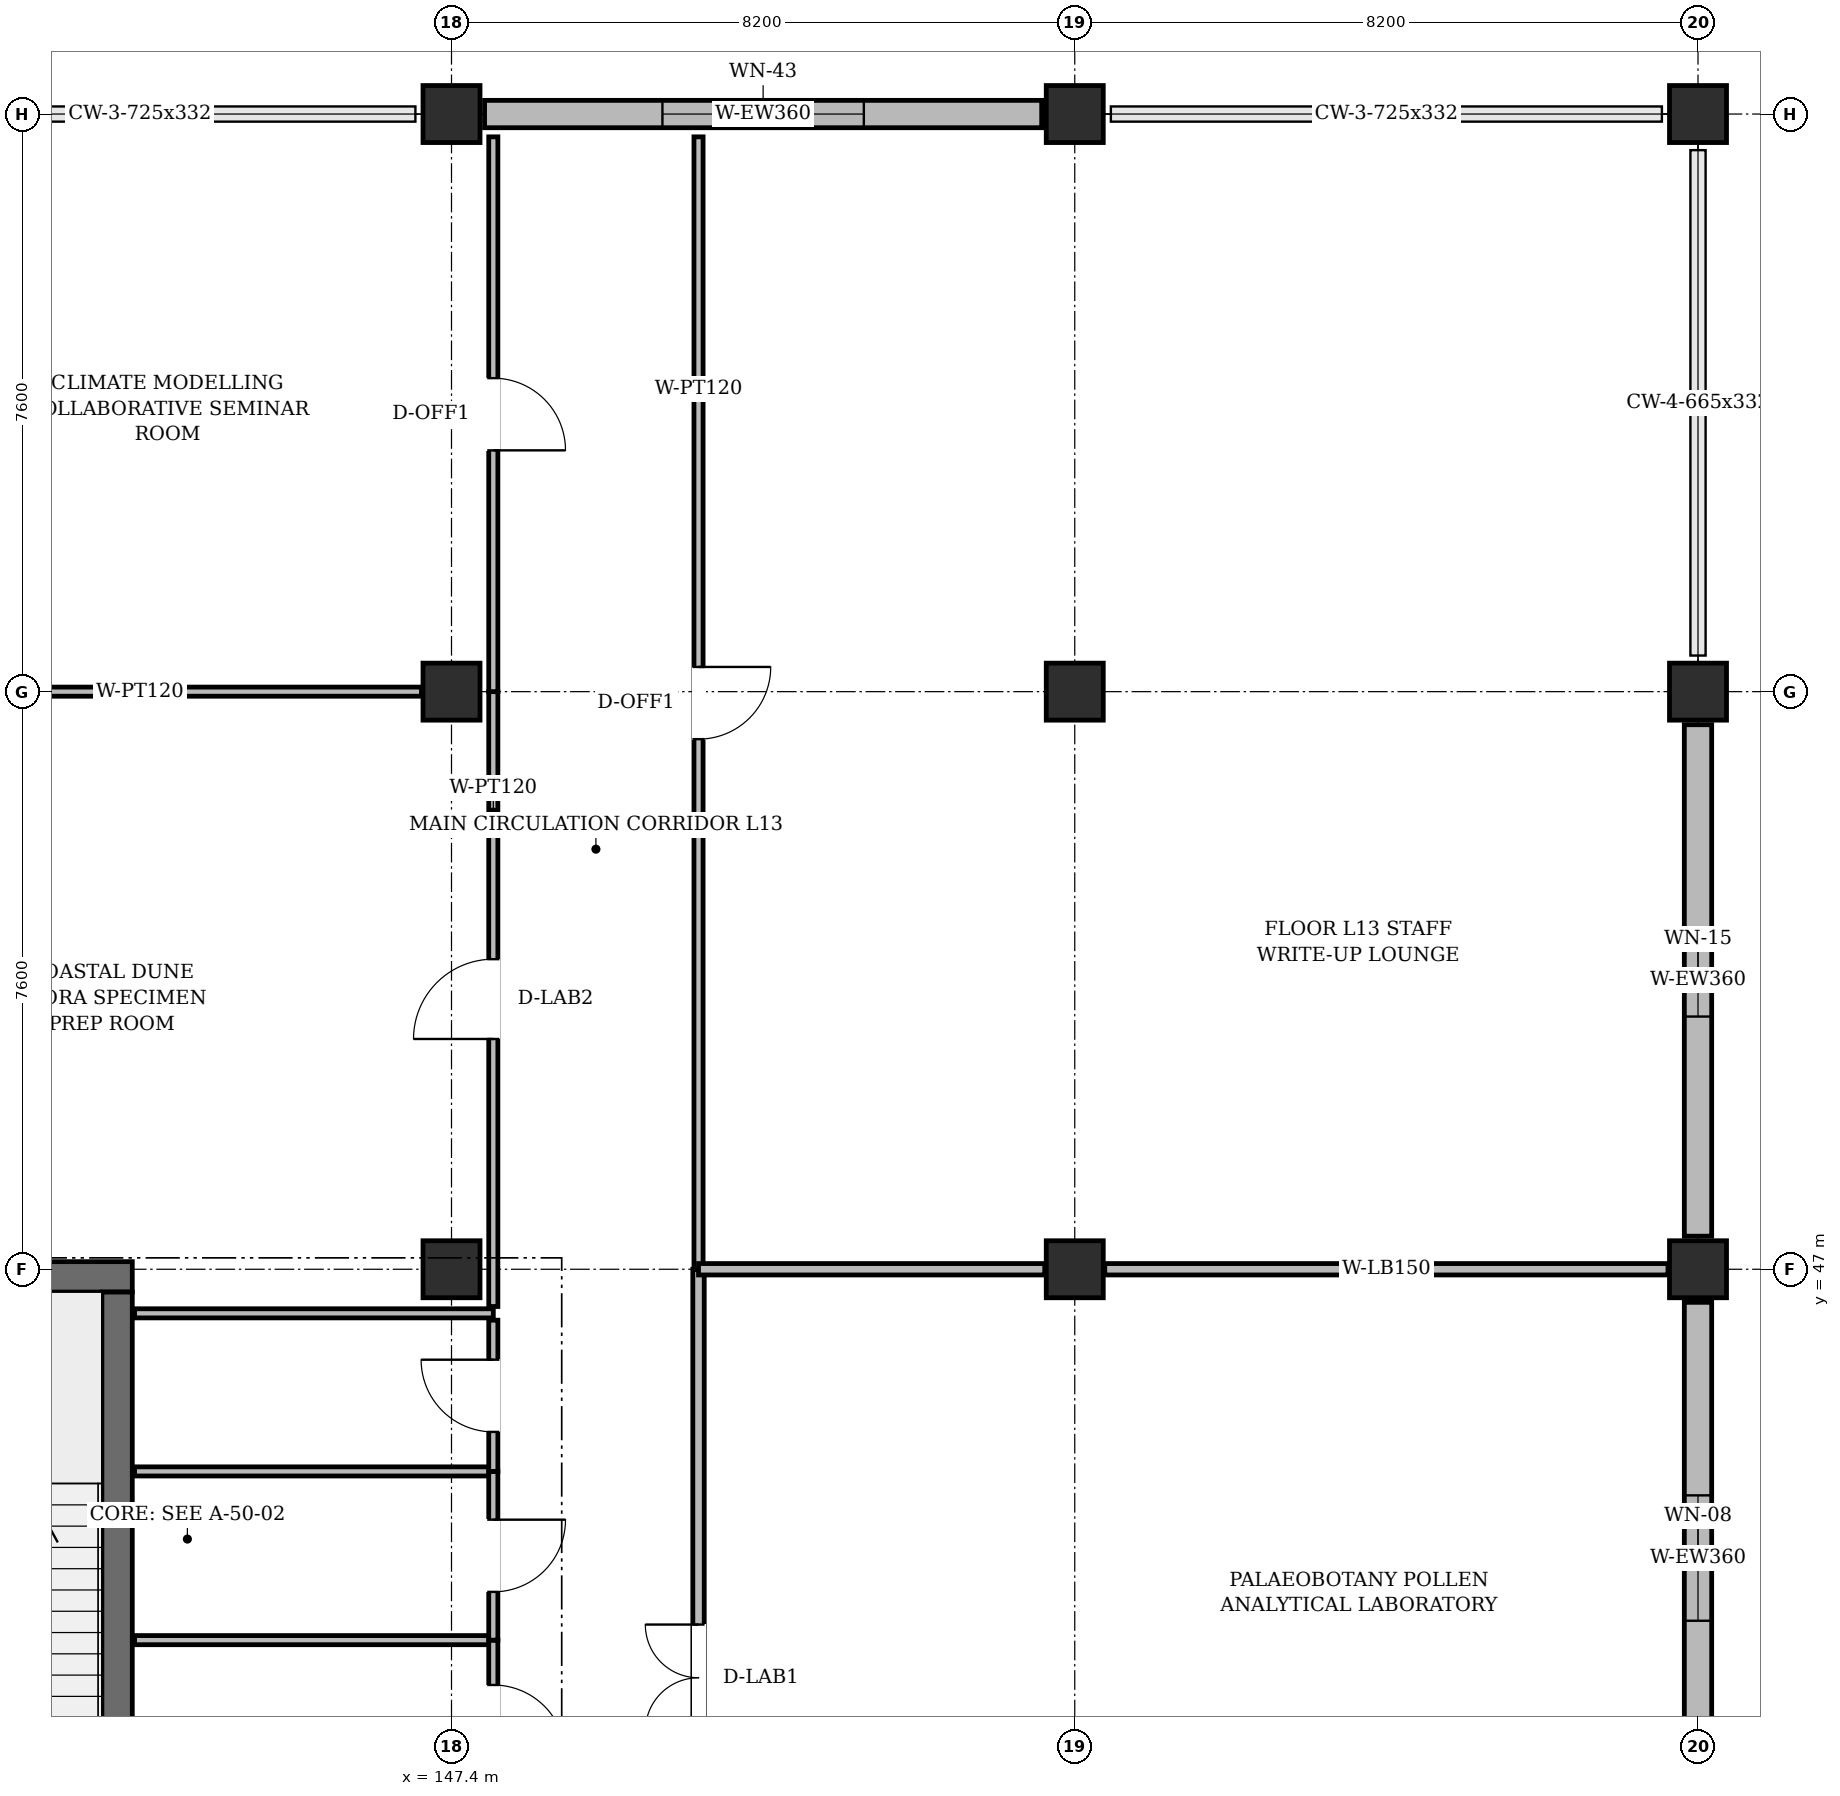
"""IFC4 building model, lengths in metres.
Left out: names, types, materials, properties, quantities, classifications, styles, units other than length and angle.
Written with IfcOpenShell. Run it as: python <this file> out.ifc"""

import sys

from ifc_helpers import new_model, si_unit, direction, frame, frame_2d, origin, origin_2d, place, context, subcontext, project, spatial, rectangle, extrude, element, fill, save


model = new_model("IFC4")
c1 = context("Model", 3, precision=1e-05, world=origin(), true_north=direction((0.0, 1.0)))
c2 = subcontext(c1, "Body", "Model", "MODEL_VIEW")
j1 = project(units=[si_unit("LENGTHUNIT", "METRE"), si_unit("PLANEANGLEUNIT", "RADIAN")], contexts=[c1])
p1 = place(None, origin())
s1 = spatial("IfcSite", under=j1, at=p1, CompositionType="ELEMENT")
p2 = place(p1, origin())
s2 = spatial("IfcBuilding", under=s1, at=p2, CompositionType="ELEMENT")
p3 = place(p2, frame((0.0, 0.0, 57.6)))
s3 = spatial("IfcBuildingStorey", under=s2, at=p3, CompositionType="ELEMENT", Elevation=57.6)
for number, where, z_axis, x_axis in (
    (1, (147.4, 47.0, 0.0), (0.0, 0.0, 1.0), (1.0, 0.0, 0.0)),
    (2, (147.4, 54.6, 0.0), (0.0, 0.0, 1.0), (1.0, 0.0, 0.0)),
    (3, (147.4, 62.2, 0.0), (0.0, 0.0, 1.0), (1.0, 0.0, 0.0)),
    (4, (155.6, 47.0, 0.0), (0.0, 0.0, 1.0), (1.0, 0.0, 0.0)),
    (5, (155.6, 54.6, 0.0), (0.0, 0.0, 1.0), (1.0, 0.0, 0.0)),
    (6, (155.6, 62.2, 0.0), (0.0, 0.0, 1.0), (1.0, 0.0, 0.0)),
    (7, (163.8, 47.0, 0.0), (0.0, 0.0, 1.0), (1.0, 0.0, 0.0)),
    (8, (163.8, 54.6, 0.0), (0.0, 0.0, 1.0), (1.0, 0.0, 0.0)),
    (9, (163.8, 62.2, 0.0), (0.0, 0.0, 1.0), (1.0, 0.0, 0.0)),
):
    element("IfcColumn", number, at=place(p3, frame(where, z_axis=z_axis, x_axis=x_axis)), inside=s3, PredefinedType="COLUMN", context=c2, shape_type="SweptSolid", body=[
        extrude(rectangle(XDim=0.75, YDim=0.75, at=origin_2d()), origin(), (0.0, 0.0, 1.0), 3.92),
    ])
p4 = place(p3, frame((163.8, 39.835, 0.0), z_axis=(0.0, 0.0, 1.0), x_axis=(0.0, 1.0, 0.0)))
e10 = element("IfcWall", 10, at=p4, inside=s3, PredefinedType="SOLIDWALL", context=c2, shape_type="SweptSolid", body=[
    extrude(rectangle(XDim=6.73, YDim=0.36, at=frame_2d((3.365, 0.0))), origin(), (0.0, 0.0, 1.0), 3.305),
])
p5 = place(p4, frame((2.54, 0.0, 0.95)))
e11 = element("IfcOpeningElement", 11, at=p5, cuts=e10, PredefinedType="OPENING", context=c2, shape_type="SweptSolid", body=[
    extrude(rectangle(XDim=1.65, YDim=2.0, at=frame_2d((0.825, 1.0))), frame((0.0, 0.192, 0.0), z_axis=(0.0, -1.0, 0.0), x_axis=(1.0, 0.0, 0.0)), (0.0, 0.0, 1.0), 0.384),
])
p6 = place(p3, frame((163.8, 47.435, 0.0), z_axis=(0.0, 0.0, 1.0), x_axis=(0.0, 1.0, 0.0)))
e12 = element("IfcWall", 12, at=p6, inside=s3, PredefinedType="SOLIDWALL", context=c2, shape_type="SweptSolid", body=[
    extrude(rectangle(XDim=6.73, YDim=0.36, at=frame_2d((3.365, 0.0))), origin(), (0.0, 0.0, 1.0), 3.305),
])
p7 = place(p6, frame((2.89, 0.0, 0.95)))
e13 = element("IfcOpeningElement", 13, at=p7, cuts=e12, PredefinedType="OPENING", context=c2, shape_type="SweptSolid", body=[
    extrude(rectangle(XDim=0.95, YDim=1.75, at=frame_2d((0.475, 0.875))), frame((0.0, 0.192, 0.0), z_axis=(0.0, -1.0, 0.0), x_axis=(1.0, 0.0, 0.0)), (0.0, 0.0, 1.0), 0.384),
])
p8 = place(p3, frame((155.165, 62.2, 0.0), z_axis=(0.0, 0.0, 1.0), x_axis=(-1.0, 0.0, 0.0)))
e14 = element("IfcWall", 14, at=p8, inside=s3, PredefinedType="SOLIDWALL", context=c2, shape_type="SweptSolid", body=[
    extrude(rectangle(XDim=7.33, YDim=0.36, at=frame_2d((3.665, 0.0))), origin(), (0.0, 0.0, 1.0), 3.305),
])
p9 = place(p8, frame((2.34, 0.0, 0.95)))
e15 = element("IfcOpeningElement", 15, at=p9, cuts=e14, PredefinedType="OPENING", context=c2, shape_type="SweptSolid", body=[
    extrude(rectangle(XDim=2.65, YDim=1.75, at=frame_2d((1.325, 0.875))), frame((0.0, 0.192, 0.0), z_axis=(0.0, -1.0, 0.0), x_axis=(1.0, 0.0, 0.0)), (0.0, 0.0, 1.0), 0.384),
])
p10 = place(p3, frame((139.4, 46.9, 0.0), z_axis=(0.0, 0.0, 1.0), x_axis=(1.0, 0.0, 0.0)))
e16 = element("IfcWall", 16, at=p10, inside=s3, PredefinedType="SHEAR", context=c2, shape_type="SweptSolid", body=[
    extrude(rectangle(XDim=3.8, YDim=0.4, at=frame_2d((1.9, 0.0))), origin(), (0.0, 0.0, 1.0), 3.92),
])
p11 = place(p3, frame((143.0, 39.7, 0.0), z_axis=(0.0, 0.0, 1.0), x_axis=(0.0, 1.0, 0.0)))
e17 = element("IfcWall", 17, at=p11, inside=s3, PredefinedType="SHEAR", context=c2, shape_type="SweptSolid", body=[
    extrude(rectangle(XDim=7.0, YDim=0.4, at=frame_2d((3.5, 0.0))), origin(), (0.0, 0.0, 1.0), 3.92),
])
p12 = place(p3, frame((143.23, 46.42, 0.0), z_axis=(0.0, 0.0, 1.0), x_axis=(1.0, 0.0, 0.0)))
e18 = element("IfcWall", 18, at=p12, inside=s3, PredefinedType="PARTITIONING", context=c2, shape_type="SweptSolid", body=[
    extrude(rectangle(XDim=4.72, YDim=0.12, at=frame_2d((2.36, 0.0))), origin(), (0.0, 0.0, 1.0), 3.805),
])
p13 = place(p3, frame((143.23, 42.12, 0.0), z_axis=(0.0, 0.0, 1.0), x_axis=(1.0, 0.0, 0.0)))
e19 = element("IfcWall", 19, at=p13, inside=s3, PredefinedType="PARTITIONING", context=c2, shape_type="SweptSolid", body=[
    extrude(rectangle(XDim=4.72, YDim=0.12, at=frame_2d((2.36, 0.0))), origin(), (0.0, 0.0, 1.0), 3.395),
])
p14 = place(p3, frame((147.95, 42.12, 0.0), z_axis=(0.0, 0.0, 1.0), x_axis=(0.0, -1.0, 0.0)))
e20 = element("IfcWall", 20, at=p14, inside=s3, PredefinedType="PARTITIONING", context=c2, shape_type="SweptSolid", body=[
    extrude(rectangle(XDim=2.13, YDim=0.12, at=frame_2d((1.065, 0.0))), origin(), (0.0, 0.0, 1.0), 3.805),
])
p15 = place(p14, frame((0.59, 0.0, 0.0)))
e21 = element("IfcOpeningElement", 21, at=p15, cuts=e20, PredefinedType="OPENING", context=c2, shape_type="SweptSolid", body=[
    extrude(rectangle(XDim=0.95, YDim=2.15, at=frame_2d((0.475, 1.075))), frame((0.0, 0.072, 0.0), z_axis=(0.0, -1.0, 0.0), x_axis=(1.0, 0.0, 0.0)), (0.0, 0.0, 1.0), 0.144),
])
p16 = place(p3, frame((143.23, 44.34, 0.0), z_axis=(0.0, 0.0, 1.0), x_axis=(1.0, 0.0, 0.0)))
e22 = element("IfcWall", 22, at=p16, inside=s3, PredefinedType="PARTITIONING", context=c2, shape_type="SweptSolid", body=[
    extrude(rectangle(XDim=4.72, YDim=0.12, at=frame_2d((2.36, 0.0))), origin(), (0.0, 0.0, 1.0), 3.345),
])
p17 = place(p3, frame((147.95, 44.34, 0.0), z_axis=(0.0, 0.0, 1.0), x_axis=(0.0, -1.0, 0.0)))
e23 = element("IfcWall", 23, at=p17, inside=s3, PredefinedType="PARTITIONING", context=c2, shape_type="SweptSolid", body=[
    extrude(rectangle(XDim=2.22, YDim=0.12, at=frame_2d((1.11, 0.0))), origin(), (0.0, 0.0, 1.0), 3.805),
])
p18 = place(p17, frame((0.635, 0.0, 0.0)))
e24 = element("IfcOpeningElement", 24, at=p18, cuts=e23, PredefinedType="OPENING", context=c2, shape_type="SweptSolid", body=[
    extrude(rectangle(XDim=0.95, YDim=2.15, at=frame_2d((0.475, 1.075))), frame((0.0, 0.072, 0.0), z_axis=(0.0, -1.0, 0.0), x_axis=(1.0, 0.0, 0.0)), (0.0, 0.0, 1.0), 0.144),
])
p19 = place(p3, frame((147.95, 46.33, 0.0), z_axis=(0.0, 0.0, 1.0), x_axis=(0.0, -1.0, 0.0)))
e25 = element("IfcWall", 25, at=p19, inside=s3, PredefinedType="PARTITIONING", context=c2, shape_type="SweptSolid", body=[
    extrude(rectangle(XDim=1.99, YDim=0.12, at=frame_2d((0.995, 0.0))), origin(), (0.0, 0.0, 1.0), 3.805),
])
p20 = place(p19, frame((0.52, 0.0, 0.0)))
e26 = element("IfcOpeningElement", 26, at=p20, cuts=e25, PredefinedType="OPENING", context=c2, shape_type="SweptSolid", body=[
    extrude(rectangle(XDim=0.95, YDim=2.15, at=frame_2d((0.475, 1.075))), frame((0.0, 0.072, 0.0), z_axis=(0.0, -1.0, 0.0), x_axis=(1.0, 0.0, 0.0)), (0.0, 0.0, 1.0), 0.144),
])
p21 = place(p3, frame((150.65, 47.0, 0.0), z_axis=(0.0, 0.0, 1.0), x_axis=(0.0, -1.0, 0.0)))
e27 = element("IfcWall", 27, at=p21, inside=s3, PredefinedType="PARTITIONING", context=c2, shape_type="SweptSolid", body=[
    extrude(rectangle(XDim=10.75, YDim=0.15, at=frame_2d((5.375, 0.0))), origin(), (0.0, 0.0, 1.0), 3.805),
])
p22 = place(p21, frame((4.675, 0.0, 0.0)))
e28 = element("IfcOpeningElement", 28, at=p22, cuts=e27, PredefinedType="OPENING", context=c2, shape_type="SweptSolid", body=[
    extrude(rectangle(XDim=1.4, YDim=2.2, at=frame_2d((0.7, 1.1))), frame((0.0, 0.087, 0.0), z_axis=(0.0, -1.0, 0.0), x_axis=(1.0, 0.0, 0.0)), (0.0, 0.0, 1.0), 0.174),
])
p23 = place(p3, frame((147.95, 46.51, 0.0), z_axis=(0.0, 0.0, 1.0), x_axis=(0.0, 1.0, 0.0)))
e29 = element("IfcWall", 29, at=p23, inside=s3, PredefinedType="PARTITIONING", context=c2, shape_type="SweptSolid", body=[
    extrude(rectangle(XDim=8.09, YDim=0.12, at=frame_2d((4.045, 0.0))), origin(), (0.0, 0.0, 1.0), 3.805),
])
p24 = place(p23, frame((3.52, 0.0, 0.0)))
e30 = element("IfcOpeningElement", 30, at=p24, cuts=e29, PredefinedType="OPENING", context=c2, shape_type="SweptSolid", body=[
    extrude(rectangle(XDim=1.05, YDim=2.2, at=frame_2d((0.525, 1.1))), frame((0.0, 0.072, 0.0), z_axis=(0.0, -1.0, 0.0), x_axis=(1.0, 0.0, 0.0)), (0.0, 0.0, 1.0), 0.144),
])
p25 = place(p3, frame((147.95, 54.6, 0.0), z_axis=(0.0, 0.0, 1.0), x_axis=(0.0, 1.0, 0.0)))
e31 = element("IfcWall", 31, at=p25, inside=s3, PredefinedType="PARTITIONING", context=c2, shape_type="SweptSolid", body=[
    extrude(rectangle(XDim=7.3, YDim=0.12, at=frame_2d((3.65, 0.0))), origin(), (0.0, 0.0, 1.0), 3.805),
])
p26 = place(p25, frame((3.175, 0.0, 0.0)))
e32 = element("IfcOpeningElement", 32, at=p26, cuts=e31, PredefinedType="OPENING", context=c2, shape_type="SweptSolid", body=[
    extrude(rectangle(XDim=0.95, YDim=2.2, at=frame_2d((0.475, 1.1))), frame((0.0, 0.072, 0.0), z_axis=(0.0, -1.0, 0.0), x_axis=(1.0, 0.0, 0.0)), (0.0, 0.0, 1.0), 0.144),
])
p27 = place(p3, frame((150.65, 61.9, 0.0), z_axis=(0.0, 0.0, 1.0), x_axis=(0.0, -1.0, 0.0)))
e33 = element("IfcWall", 33, at=p27, inside=s3, PredefinedType="PARTITIONING", context=c2, shape_type="SweptSolid", body=[
    extrude(rectangle(XDim=14.9, YDim=0.12, at=frame_2d((7.45, 0.0))), origin(), (0.0, 0.0, 1.0), 3.805),
])
p28 = place(p27, frame((6.975, 0.0, 0.0)))
e34 = element("IfcOpeningElement", 34, at=p28, cuts=e33, PredefinedType="OPENING", context=c2, shape_type="SweptSolid", body=[
    extrude(rectangle(XDim=0.95, YDim=2.2, at=frame_2d((0.475, 1.1))), frame((0.0, 0.072, 0.0), z_axis=(0.0, -1.0, 0.0), x_axis=(1.0, 0.0, 0.0)), (0.0, 0.0, 1.0), 0.144),
])
p29 = place(p3, frame((150.65, 47.0, 0.0), z_axis=(0.0, 0.0, 1.0), x_axis=(1.0, 0.0, 0.0)))
e35 = element("IfcWall", 35, at=p29, inside=s3, PredefinedType="PARTITIONING", context=c2, shape_type="SweptSolid", body=[
    extrude(rectangle(XDim=4.555, YDim=0.15, at=frame_2d((2.278, 0.0))), origin(), (0.0, 0.0, 1.0), 3.255),
])
p30 = place(p3, frame((155.995, 47.0, 0.0), z_axis=(0.0, 0.0, 1.0), x_axis=(1.0, 0.0, 0.0)))
e36 = element("IfcWall", 36, at=p30, inside=s3, PredefinedType="PARTITIONING", context=c2, shape_type="SweptSolid", body=[
    extrude(rectangle(XDim=7.41, YDim=0.15, at=frame_2d((3.705, 0.0))), origin(), (0.0, 0.0, 1.0), 3.255),
])
p31 = place(p3, frame((139.595, 54.6, 0.0), z_axis=(0.0, 0.0, 1.0), x_axis=(1.0, 0.0, 0.0)))
e37 = element("IfcWall", 37, at=p31, inside=s3, PredefinedType="PARTITIONING", context=c2, shape_type="SweptSolid", body=[
    extrude(rectangle(XDim=7.41, YDim=0.12, at=frame_2d((3.705, 0.0))), origin(), (0.0, 0.0, 1.0), 3.255),
])
p32 = place(p5, origin())
e38 = element("IfcWindow", 38, at=p32, inside=s3, PartitioningType="DOUBLE_PANEL_VERTICAL", PredefinedType="WINDOW", context=c2, shape_type="SweptSolid", body=[
    extrude(rectangle(XDim=1.65, YDim=2.0, at=frame_2d((0.825, 1.0))), frame((0.0, 0.03, 0.0), z_axis=(0.0, -1.0, 0.0), x_axis=(1.0, 0.0, 0.0)), (0.0, 0.0, 1.0), 0.06),
])
fill(e11, e38)
p33 = place(p7, origin())
e39 = element("IfcWindow", 39, at=p33, inside=s3, PartitioningType="SINGLE_PANEL", PredefinedType="WINDOW", context=c2, shape_type="SweptSolid", body=[
    extrude(rectangle(XDim=0.95, YDim=1.75, at=frame_2d((0.475, 0.875))), frame((0.0, 0.03, 0.0), z_axis=(0.0, -1.0, 0.0), x_axis=(1.0, 0.0, 0.0)), (0.0, 0.0, 1.0), 0.06),
])
fill(e13, e39)
p34 = place(p9, origin())
e40 = element("IfcWindow", 40, at=p34, inside=s3, PartitioningType="DOUBLE_PANEL_VERTICAL", PredefinedType="WINDOW", context=c2, shape_type="SweptSolid", body=[
    extrude(rectangle(XDim=2.65, YDim=1.75, at=frame_2d((1.325, 0.875))), frame((0.0, 0.03, 0.0), z_axis=(0.0, -1.0, 0.0), x_axis=(1.0, 0.0, 0.0)), (0.0, 0.0, 1.0), 0.06),
])
fill(e15, e40)
p35 = place(p15, origin())
e41 = element("IfcDoor", 41, at=p35, inside=s3, OperationType="SINGLE_SWING_RIGHT", PredefinedType="DOOR", context=c2, shape_type="SweptSolid", body=[
    extrude(rectangle(XDim=0.95, YDim=2.15, at=frame_2d((0.475, 1.075))), frame((0.0, 0.025, 0.0), z_axis=(0.0, -1.0, 0.0), x_axis=(1.0, 0.0, 0.0)), (0.0, 0.0, 1.0), 0.05),
])
fill(e21, e41)
p36 = place(p18, origin())
e42 = element("IfcDoor", 42, at=p36, inside=s3, OperationType="SINGLE_SWING_LEFT", PredefinedType="DOOR", context=c2, shape_type="SweptSolid", body=[
    extrude(rectangle(XDim=0.95, YDim=2.15, at=frame_2d((0.475, 1.075))), frame((0.0, 0.025, 0.0), z_axis=(0.0, -1.0, 0.0), x_axis=(1.0, 0.0, 0.0)), (0.0, 0.0, 1.0), 0.05),
])
fill(e24, e42)
p37 = place(p20, frame((0.95, 0.0, 0.0), z_axis=(0.0, 0.0, 1.0), x_axis=(-1.0, 0.0, 0.0)))
e43 = element("IfcDoor", 43, at=p37, inside=s3, OperationType="SINGLE_SWING_RIGHT", PredefinedType="DOOR", context=c2, shape_type="SweptSolid", body=[
    extrude(rectangle(XDim=0.95, YDim=2.15, at=frame_2d((0.475, 1.075))), frame((0.0, 0.025, 0.0), z_axis=(0.0, -1.0, 0.0), x_axis=(1.0, 0.0, 0.0)), (0.0, 0.0, 1.0), 0.05),
])
fill(e26, e43)
p38 = place(p22, frame((1.4, 0.0, 0.0), z_axis=(0.0, 0.0, 1.0), x_axis=(-1.0, 0.0, 0.0)))
e44 = element("IfcDoor", 44, at=p38, inside=s3, OperationType="DOUBLE_DOOR_SINGLE_SWING", PredefinedType="DOOR", context=c2, shape_type="SweptSolid", body=[
    extrude(rectangle(XDim=1.4, YDim=2.2, at=frame_2d((0.7, 1.1))), frame((0.0, 0.025, 0.0), z_axis=(0.0, -1.0, 0.0), x_axis=(1.0, 0.0, 0.0)), (0.0, 0.0, 1.0), 0.05),
])
fill(e28, e44)
p39 = place(p24, origin())
e45 = element("IfcDoor", 45, at=p39, inside=s3, OperationType="SINGLE_SWING_LEFT", PredefinedType="DOOR", context=c2, shape_type="SweptSolid", body=[
    extrude(rectangle(XDim=1.05, YDim=2.2, at=frame_2d((0.525, 1.1))), frame((0.0, 0.025, 0.0), z_axis=(0.0, -1.0, 0.0), x_axis=(1.0, 0.0, 0.0)), (0.0, 0.0, 1.0), 0.05),
])
fill(e30, e45)
p40 = place(p26, frame((0.95, 0.0, 0.0), z_axis=(0.0, 0.0, 1.0), x_axis=(-1.0, 0.0, 0.0)))
e46 = element("IfcDoor", 46, at=p40, inside=s3, OperationType="SINGLE_SWING_RIGHT", PredefinedType="DOOR", context=c2, shape_type="SweptSolid", body=[
    extrude(rectangle(XDim=0.95, YDim=2.2, at=frame_2d((0.475, 1.1))), frame((0.0, 0.025, 0.0), z_axis=(0.0, -1.0, 0.0), x_axis=(1.0, 0.0, 0.0)), (0.0, 0.0, 1.0), 0.05),
])
fill(e32, e46)
p41 = place(p28, origin())
e47 = element("IfcDoor", 47, at=p41, inside=s3, OperationType="SINGLE_SWING_LEFT", PredefinedType="DOOR", context=c2, shape_type="SweptSolid", body=[
    extrude(rectangle(XDim=0.95, YDim=2.2, at=frame_2d((0.475, 1.1))), frame((0.0, 0.025, 0.0), z_axis=(0.0, -1.0, 0.0), x_axis=(1.0, 0.0, 0.0)), (0.0, 0.0, 1.0), 0.05),
])
fill(e34, e47)
save(model, sys.argv[1])
